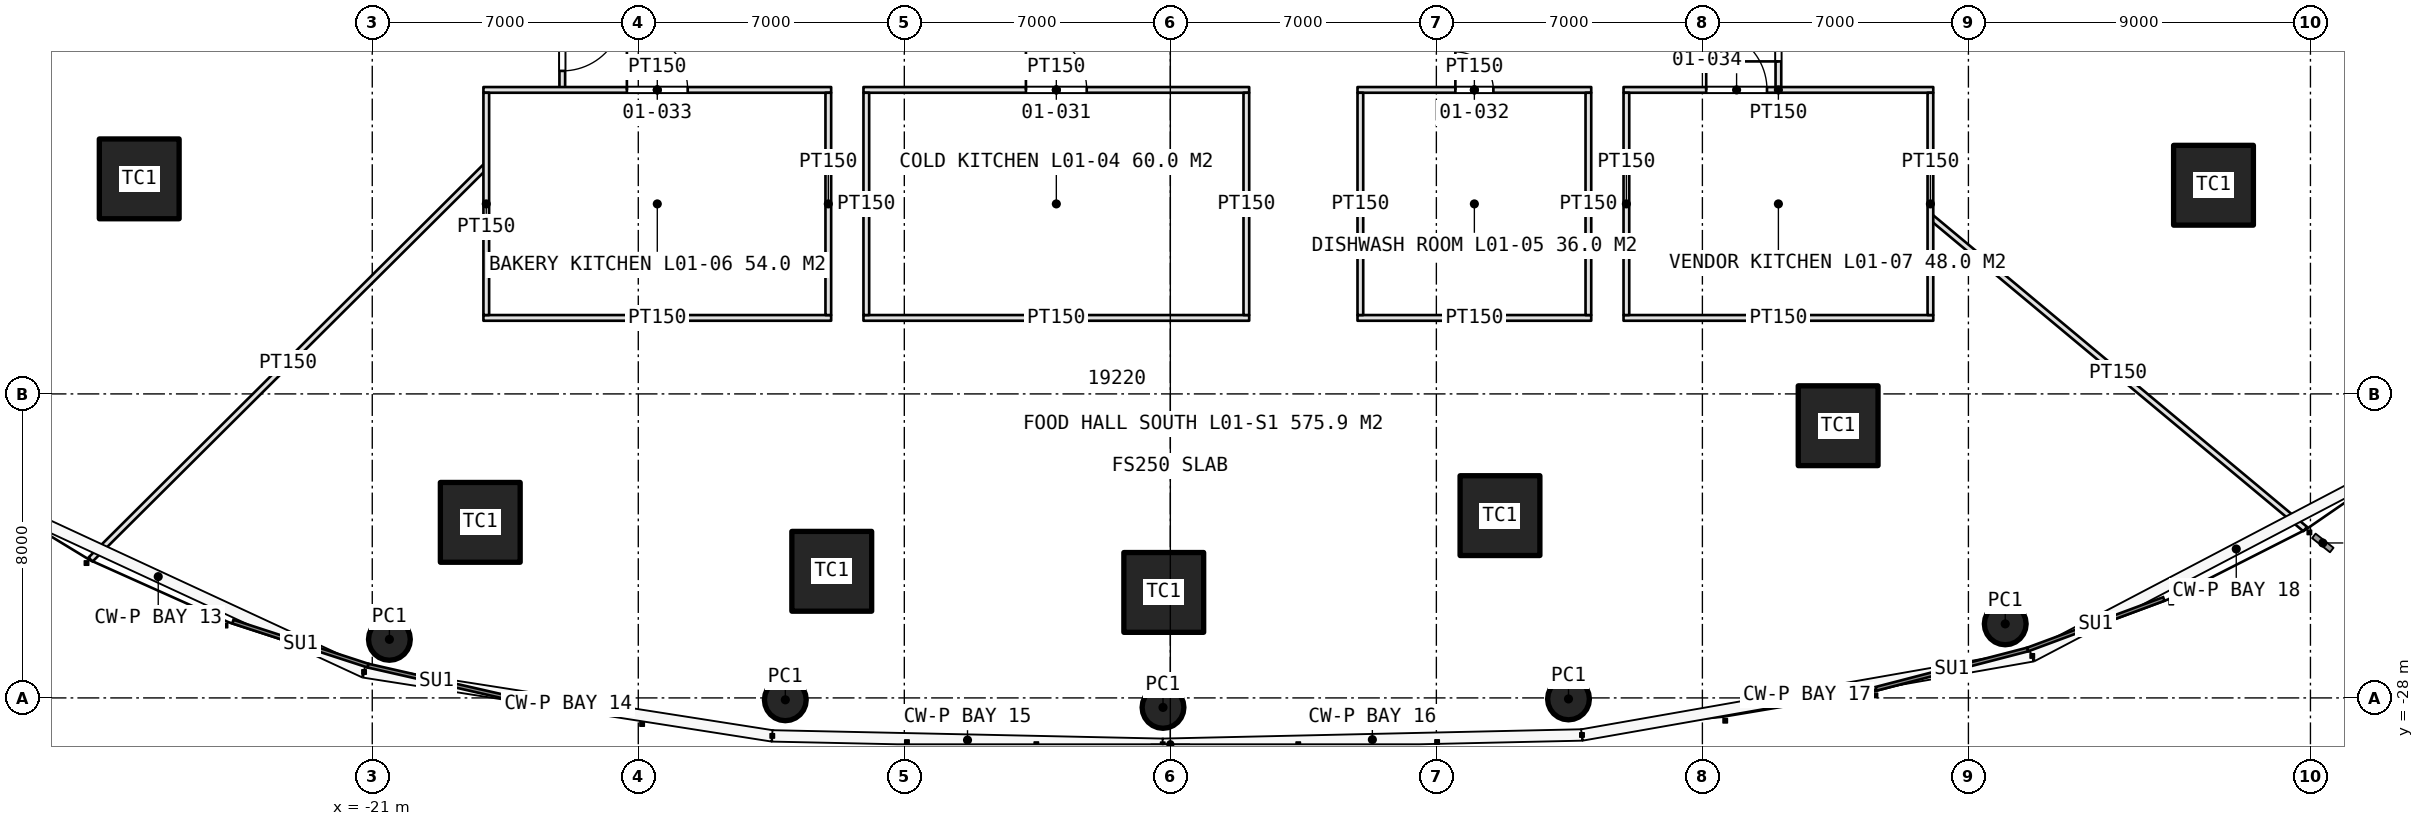
"""IFC4 building model, lengths in metres.
Left out: names, types, materials, properties, quantities, classifications, styles, units other than length and angle.
Written with IfcOpenShell. Run it as: python <this file> out.ifc"""

import sys

from ifc_helpers import new_model, si_unit, direction, frame, frame_2d, origin, origin_2d, place, context, subcontext, project, spatial, rectangle, circle, extrude, element, fill, save


model = new_model("IFC4")
c1 = context("Model", 3, precision=1e-05, world=origin(), true_north=direction((0.0, 1.0)))
c2 = subcontext(c1, "Body", "Model", "MODEL_VIEW")
j1 = project(units=[si_unit("LENGTHUNIT", "METRE"), si_unit("PLANEANGLEUNIT", "RADIAN")], contexts=[c1])
p1 = place(None, origin())
s1 = spatial("IfcSite", under=j1, at=p1, CompositionType="ELEMENT")
p2 = place(p1, origin())
s2 = spatial("IfcBuilding", under=s1, at=p2, CompositionType="ELEMENT")
p3 = place(p2, frame((0.0, 0.0, 5.0)))
s3 = spatial("IfcBuildingStorey", under=s2, at=p3, CompositionType="ELEMENT", Elevation=5.0)
for number, where, z_axis, x_axis in (
    (1, (-27.132, -14.341, 0.0), (0.0, 0.0, 1.0), (1.0, 0.0, 0.0)),
    (2, (-18.158, -23.38, 0.0), (0.0, 0.0, 1.0), (1.0, 0.0, 0.0)),
    (3, (-8.909, -24.668, 0.0), (0.0, 0.0, 1.0), (1.0, 0.0, 0.0)),
    (4, (-0.173, -25.224, 0.0), (0.0, 0.0, 1.0), (1.0, 0.0, 0.0)),
    (5, (8.674, -23.203, 0.0), (0.0, 0.0, 1.0), (1.0, 0.0, 0.0)),
    (6, (17.572, -20.837, 0.0), (0.0, 0.0, 1.0), (1.0, 0.0, 0.0)),
    (7, (27.449, -14.509, 0.0), (0.0, 0.0, 1.0), (1.0, 0.0, 0.0)),
):
    element("IfcColumn", number, at=place(p3, frame(where, z_axis=z_axis, x_axis=x_axis)), inside=s3, PredefinedType="COLUMN", context=c2, shape_type="SweptSolid", body=[
        extrude(rectangle(XDim=2.1, YDim=2.1, at=origin_2d()), origin(), (0.0, 0.0, 1.0), 5.0),
    ])
for number, where, z_axis, x_axis in (
    (8, (-20.549, -26.459, 0.0), (0.0, 0.0, 1.0), (1.0, 0.0, 0.0)),
    (9, (-10.131, -28.05, 0.0), (0.0, 0.0, 1.0), (1.0, 0.0, 0.0)),
    (10, (-0.193, -28.25, 0.0), (0.0, 0.0, 1.0), (1.0, 0.0, 0.0)),
    (11, (10.477, -28.027, 0.0), (0.0, 0.0, 1.0), (1.0, 0.0, 0.0)),
    (12, (21.969, -26.052, 0.0), (0.0, 0.0, 1.0), (1.0, 0.0, 0.0)),
):
    element("IfcColumn", number, at=place(p3, frame(where, z_axis=z_axis, x_axis=x_axis)), inside=s3, PredefinedType="COLUMN", context=c2, shape_type="SweptSolid", body=[
        extrude(circle(Radius=0.55, at=origin_2d()), origin(), (0.0, 0.0, 1.0), 5.0),
    ])
p4 = place(p3, frame((-18.02, -14.011, 0.0), z_axis=(0.0, 0.0, 1.0), x_axis=(-0.708653309279, -0.705556863228, 0.0)))
e13 = element("IfcWall", 13, at=p4, inside=s3, PredefinedType="PARTITIONING", context=c2, shape_type="SweptSolid", body=[
    extrude(rectangle(XDim=14.665, YDim=0.15, at=frame_2d((7.333, 0.0))), origin(), (0.0, 0.0, 1.0), 3.8),
])
p5 = place(p3, frame((20.02, -15.351, 0.0), z_axis=(0.0, 0.0, 1.0), x_axis=(0.768090061495, -0.640341828582, 0.0)))
e14 = element("IfcWall", 14, at=p5, inside=s3, PredefinedType="PARTITIONING", context=c2, shape_type="SweptSolid", body=[
    extrude(rectangle(XDim=12.812, YDim=0.15, at=frame_2d((6.406, 0.0))), origin(), (0.0, 0.0, 1.0), 3.8),
])
p6 = place(p3, frame((16.0, -12.0, 0.0), z_axis=(0.0, 0.0, 1.0), x_axis=(0.0, 1.0, 0.0)))
e15 = element("IfcWall", 15, at=p6, inside=s3, PredefinedType="PARTITIONING", context=c2, shape_type="SweptSolid", body=[
    extrude(rectangle(XDim=24.0, YDim=0.15, at=frame_2d((12.0, 0.0))), origin(), (0.0, 0.0, 1.0), 3.8),
])
p7 = place(p6, frame((10.15, 0.0, 0.0)))
e16 = element("IfcOpeningElement", 16, at=p7, cuts=e15, PredefinedType="OPENING", context=c2, shape_type="SweptSolid", body=[
    extrude(rectangle(XDim=1.6, YDim=2.4, at=frame_2d((0.8, 1.2))), frame((0.0, 0.085, 0.0), z_axis=(0.0, -1.0, 0.0), x_axis=(1.0, 0.0, 0.0)), (0.0, 0.0, 1.0), 0.17),
])
p8 = place(p6, frame((21.9, 0.0, 0.0)))
e17 = element("IfcOpeningElement", 17, at=p8, cuts=e15, PredefinedType="OPENING", context=c2, shape_type="SweptSolid", body=[
    extrude(rectangle(XDim=1.6, YDim=2.4, at=frame_2d((0.8, 1.2))), frame((0.0, 0.085, 0.0), z_axis=(0.0, -1.0, 0.0), x_axis=(1.0, 0.0, 0.0)), (0.0, 0.0, 1.0), 0.17),
])
p9 = place(p6, frame((0.75, 0.0, 0.0)))
e18 = element("IfcOpeningElement", 18, at=p9, cuts=e15, PredefinedType="OPENING", context=c2, shape_type="SweptSolid", body=[
    extrude(rectangle(XDim=1.6, YDim=2.4, at=frame_2d((0.8, 1.2))), frame((0.0, 0.085, 0.0), z_axis=(0.0, -1.0, 0.0), x_axis=(1.0, 0.0, 0.0)), (0.0, 0.0, 1.0), 0.17),
])
p10 = place(p3, frame((-16.0, 12.0, 0.0), z_axis=(0.0, 0.0, 1.0), x_axis=(0.0, -1.0, 0.0)))
e19 = element("IfcWall", 19, at=p10, inside=s3, PredefinedType="PARTITIONING", context=c2, shape_type="SweptSolid", body=[
    extrude(rectangle(XDim=24.0, YDim=0.15, at=frame_2d((12.0, 0.0))), origin(), (0.0, 0.0, 1.0), 3.8),
])
p11 = place(p10, frame((12.15, 0.0, 0.0)))
e20 = element("IfcOpeningElement", 20, at=p11, cuts=e19, PredefinedType="OPENING", context=c2, shape_type="SweptSolid", body=[
    extrude(rectangle(XDim=1.6, YDim=2.4, at=frame_2d((0.8, 1.2))), frame((0.0, 0.085, 0.0), z_axis=(0.0, -1.0, 0.0), x_axis=(1.0, 0.0, 0.0)), (0.0, 0.0, 1.0), 0.17),
])
p12 = place(p10, frame((0.4, 0.0, 0.0)))
e21 = element("IfcOpeningElement", 21, at=p12, cuts=e19, PredefinedType="OPENING", context=c2, shape_type="SweptSolid", body=[
    extrude(rectangle(XDim=1.6, YDim=2.4, at=frame_2d((0.8, 1.2))), frame((0.0, 0.085, 0.0), z_axis=(0.0, -1.0, 0.0), x_axis=(1.0, 0.0, 0.0)), (0.0, 0.0, 1.0), 0.17),
])
p13 = place(p10, frame((21.9, 0.0, 0.0)))
e22 = element("IfcOpeningElement", 22, at=p13, cuts=e19, PredefinedType="OPENING", context=c2, shape_type="SweptSolid", body=[
    extrude(rectangle(XDim=1.6, YDim=2.4, at=frame_2d((0.8, 1.2))), frame((0.0, 0.085, 0.0), z_axis=(0.0, -1.0, 0.0), x_axis=(1.0, 0.0, 0.0)), (0.0, 0.0, 1.0), 0.17),
])
p14 = place(p3, frame((-8.075, -18.0, 0.0), z_axis=(0.0, 0.0, 1.0), x_axis=(1.0, 0.0, 0.0)))
e23 = element("IfcWall", 23, at=p14, inside=s3, PredefinedType="PARTITIONING", context=c2, shape_type="SweptSolid", body=[
    extrude(rectangle(XDim=10.15, YDim=0.15, at=frame_2d((5.075, 0.0))), origin(), (0.0, 0.0, 1.0), 3.8),
])
p15 = place(p3, frame((-8.075, -12.0, 0.0), z_axis=(0.0, 0.0, 1.0), x_axis=(1.0, 0.0, 0.0)))
e24 = element("IfcWall", 24, at=p15, inside=s3, PredefinedType="PARTITIONING", context=c2, shape_type="SweptSolid", body=[
    extrude(rectangle(XDim=10.15, YDim=0.15, at=frame_2d((5.075, 0.0))), origin(), (0.0, 0.0, 1.0), 3.8),
])
p16 = place(p15, frame((4.275, 0.0, 0.0)))
e25 = element("IfcOpeningElement", 25, at=p16, cuts=e24, PredefinedType="OPENING", context=c2, shape_type="SweptSolid", body=[
    extrude(rectangle(XDim=1.6, YDim=2.4, at=frame_2d((0.8, 1.2))), frame((0.0, 0.085, 0.0), z_axis=(0.0, -1.0, 0.0), x_axis=(1.0, 0.0, 0.0)), (0.0, 0.0, 1.0), 0.17),
])
for number, where, z_axis, x_axis in (
    (26, (-8.0, -17.925, 0.0), (0.0, 0.0, 1.0), (0.0, 1.0, 0.0)),
    (27, (2.0, -17.925, 0.0), (0.0, 0.0, 1.0), (0.0, 1.0, 0.0)),
):
    element("IfcWall", number, at=place(p3, frame(where, z_axis=z_axis, x_axis=x_axis)), inside=s3, PredefinedType="PARTITIONING", context=c2, shape_type="SweptSolid", body=[
        extrude(rectangle(XDim=5.85, YDim=0.15, at=frame_2d((2.925, 0.0))), origin(), (0.0, 0.0, 1.0), 3.8),
    ])
p17 = place(p3, frame((4.925, -18.0, 0.0), z_axis=(0.0, 0.0, 1.0), x_axis=(1.0, 0.0, 0.0)))
e28 = element("IfcWall", 28, at=p17, inside=s3, PredefinedType="PARTITIONING", context=c2, shape_type="SweptSolid", body=[
    extrude(rectangle(XDim=6.15, YDim=0.15, at=frame_2d((3.075, 0.0))), origin(), (0.0, 0.0, 1.0), 3.8),
])
p18 = place(p3, frame((4.925, -12.0, 0.0), z_axis=(0.0, 0.0, 1.0), x_axis=(1.0, 0.0, 0.0)))
e29 = element("IfcWall", 29, at=p18, inside=s3, PredefinedType="PARTITIONING", context=c2, shape_type="SweptSolid", body=[
    extrude(rectangle(XDim=6.15, YDim=0.15, at=frame_2d((3.075, 0.0))), origin(), (0.0, 0.0, 1.0), 3.8),
])
p19 = place(p18, frame((2.575, 0.0, 0.0)))
e30 = element("IfcOpeningElement", 30, at=p19, cuts=e29, PredefinedType="OPENING", context=c2, shape_type="SweptSolid", body=[
    extrude(rectangle(XDim=1.0, YDim=2.2, at=frame_2d((0.5, 1.1))), frame((0.0, 0.085, 0.0), z_axis=(0.0, -1.0, 0.0), x_axis=(1.0, 0.0, 0.0)), (0.0, 0.0, 1.0), 0.17),
])
for number, where, z_axis, x_axis in (
    (31, (5.0, -17.925, 0.0), (0.0, 0.0, 1.0), (0.0, 1.0, 0.0)),
    (32, (11.0, -17.925, 0.0), (0.0, 0.0, 1.0), (0.0, 1.0, 0.0)),
):
    element("IfcWall", number, at=place(p3, frame(where, z_axis=z_axis, x_axis=x_axis)), inside=s3, PredefinedType="PARTITIONING", context=c2, shape_type="SweptSolid", body=[
        extrude(rectangle(XDim=5.85, YDim=0.15, at=frame_2d((2.925, 0.0))), origin(), (0.0, 0.0, 1.0), 3.8),
    ])
p20 = place(p3, frame((-18.075, -18.0, 0.0), z_axis=(0.0, 0.0, 1.0), x_axis=(1.0, 0.0, 0.0)))
e33 = element("IfcWall", 33, at=p20, inside=s3, PredefinedType="PARTITIONING", context=c2, shape_type="SweptSolid", body=[
    extrude(rectangle(XDim=9.15, YDim=0.15, at=frame_2d((4.575, 0.0))), origin(), (0.0, 0.0, 1.0), 3.8),
])
p21 = place(p3, frame((-18.075, -12.0, 0.0), z_axis=(0.0, 0.0, 1.0), x_axis=(1.0, 0.0, 0.0)))
e34 = element("IfcWall", 34, at=p21, inside=s3, PredefinedType="PARTITIONING", context=c2, shape_type="SweptSolid", body=[
    extrude(rectangle(XDim=9.15, YDim=0.15, at=frame_2d((4.575, 0.0))), origin(), (0.0, 0.0, 1.0), 3.8),
])
p22 = place(p21, frame((3.775, 0.0, 0.0)))
e35 = element("IfcOpeningElement", 35, at=p22, cuts=e34, PredefinedType="OPENING", context=c2, shape_type="SweptSolid", body=[
    extrude(rectangle(XDim=1.6, YDim=2.4, at=frame_2d((0.8, 1.2))), frame((0.0, 0.085, 0.0), z_axis=(0.0, -1.0, 0.0), x_axis=(1.0, 0.0, 0.0)), (0.0, 0.0, 1.0), 0.17),
])
for number, where, z_axis, x_axis in (
    (36, (-18.0, -17.925, 0.0), (0.0, 0.0, 1.0), (0.0, 1.0, 0.0)),
    (37, (-9.0, -17.925, 0.0), (0.0, 0.0, 1.0), (0.0, 1.0, 0.0)),
):
    element("IfcWall", number, at=place(p3, frame(where, z_axis=z_axis, x_axis=x_axis)), inside=s3, PredefinedType="PARTITIONING", context=c2, shape_type="SweptSolid", body=[
        extrude(rectangle(XDim=5.85, YDim=0.15, at=frame_2d((2.925, 0.0))), origin(), (0.0, 0.0, 1.0), 3.8),
    ])
p23 = place(p3, frame((11.925, -18.0, 0.0), z_axis=(0.0, 0.0, 1.0), x_axis=(1.0, 0.0, 0.0)))
e38 = element("IfcWall", 38, at=p23, inside=s3, PredefinedType="PARTITIONING", context=c2, shape_type="SweptSolid", body=[
    extrude(rectangle(XDim=8.15, YDim=0.15, at=frame_2d((4.075, 0.0))), origin(), (0.0, 0.0, 1.0), 3.8),
])
p24 = place(p3, frame((11.925, -12.0, 0.0), z_axis=(0.0, 0.0, 1.0), x_axis=(1.0, 0.0, 0.0)))
e39 = element("IfcWall", 39, at=p24, inside=s3, PredefinedType="PARTITIONING", context=c2, shape_type="SweptSolid", body=[
    extrude(rectangle(XDim=8.15, YDim=0.15, at=frame_2d((4.075, 0.0))), origin(), (0.0, 0.0, 1.0), 3.8),
])
p25 = place(p24, frame((2.175, 0.0, 0.0)))
e40 = element("IfcOpeningElement", 40, at=p25, cuts=e39, PredefinedType="OPENING", context=c2, shape_type="SweptSolid", body=[
    extrude(rectangle(XDim=1.6, YDim=2.4, at=frame_2d((0.8, 1.2))), frame((0.0, 0.085, 0.0), z_axis=(0.0, -1.0, 0.0), x_axis=(1.0, 0.0, 0.0)), (0.0, 0.0, 1.0), 0.17),
])
for number, where, z_axis, x_axis in (
    (41, (12.0, -17.925, 0.0), (0.0, 0.0, 1.0), (0.0, 1.0, 0.0)),
    (42, (20.0, -17.925, 0.0), (0.0, 0.0, 1.0), (0.0, 1.0, 0.0)),
):
    element("IfcWall", number, at=place(p3, frame(where, z_axis=z_axis, x_axis=x_axis)), inside=s3, PredefinedType="PARTITIONING", context=c2, shape_type="SweptSolid", body=[
        extrude(rectangle(XDim=5.85, YDim=0.15, at=frame_2d((2.925, 0.0))), origin(), (0.0, 0.0, 1.0), 3.8),
    ])
p26 = place(p16, origin())
e43 = element("IfcDoor", 43, at=p26, inside=s3, OperationType="DOUBLE_DOOR_SINGLE_SWING", PredefinedType="DOOR", context=c2, shape_type="SweptSolid", body=[
    extrude(rectangle(XDim=1.6, YDim=2.4, at=frame_2d((0.8, 1.2))), frame((0.0, 0.025, 0.0), z_axis=(0.0, -1.0, 0.0), x_axis=(1.0, 0.0, 0.0)), (0.0, 0.0, 1.0), 0.05),
])
fill(e25, e43)
p27 = place(p19, origin())
e44 = element("IfcDoor", 44, at=p27, inside=s3, OperationType="SINGLE_SWING_LEFT", PredefinedType="DOOR", context=c2, shape_type="SweptSolid", body=[
    extrude(rectangle(XDim=1.0, YDim=2.2, at=frame_2d((0.5, 1.1))), frame((0.0, 0.025, 0.0), z_axis=(0.0, -1.0, 0.0), x_axis=(1.0, 0.0, 0.0)), (0.0, 0.0, 1.0), 0.05),
])
fill(e30, e44)
p28 = place(p22, origin())
e45 = element("IfcDoor", 45, at=p28, inside=s3, OperationType="DOUBLE_DOOR_SINGLE_SWING", PredefinedType="DOOR", context=c2, shape_type="SweptSolid", body=[
    extrude(rectangle(XDim=1.6, YDim=2.4, at=frame_2d((0.8, 1.2))), frame((0.0, 0.025, 0.0), z_axis=(0.0, -1.0, 0.0), x_axis=(1.0, 0.0, 0.0)), (0.0, 0.0, 1.0), 0.05),
])
fill(e35, e45)
p29 = place(p25, origin())
e46 = element("IfcDoor", 46, at=p29, inside=s3, OperationType="DOUBLE_DOOR_SINGLE_SWING", PredefinedType="DOOR", context=c2, shape_type="SweptSolid", body=[
    extrude(rectangle(XDim=1.6, YDim=2.4, at=frame_2d((0.8, 1.2))), frame((0.0, 0.025, 0.0), z_axis=(0.0, -1.0, 0.0), x_axis=(1.0, 0.0, 0.0)), (0.0, 0.0, 1.0), 0.05),
])
fill(e40, e46)
p30 = place(p9, origin())
e47 = element("IfcDoor", 47, at=p30, inside=s3, OperationType="DOUBLE_DOOR_SINGLE_SWING", PredefinedType="DOOR", context=c2, shape_type="SweptSolid", body=[
    extrude(rectangle(XDim=1.6, YDim=2.4, at=frame_2d((0.8, 1.2))), frame((0.0, 0.025, 0.0), z_axis=(0.0, -1.0, 0.0), x_axis=(1.0, 0.0, 0.0)), (0.0, 0.0, 1.0), 0.05),
])
fill(e18, e47)
p31 = place(p13, origin())
e48 = element("IfcDoor", 48, at=p31, inside=s3, OperationType="DOUBLE_DOOR_SINGLE_SWING", PredefinedType="DOOR", context=c2, shape_type="SweptSolid", body=[
    extrude(rectangle(XDim=1.6, YDim=2.4, at=frame_2d((0.8, 1.2))), frame((0.0, 0.025, 0.0), z_axis=(0.0, -1.0, 0.0), x_axis=(1.0, 0.0, 0.0)), (0.0, 0.0, 1.0), 0.05),
])
fill(e22, e48)
save(model, sys.argv[1])
